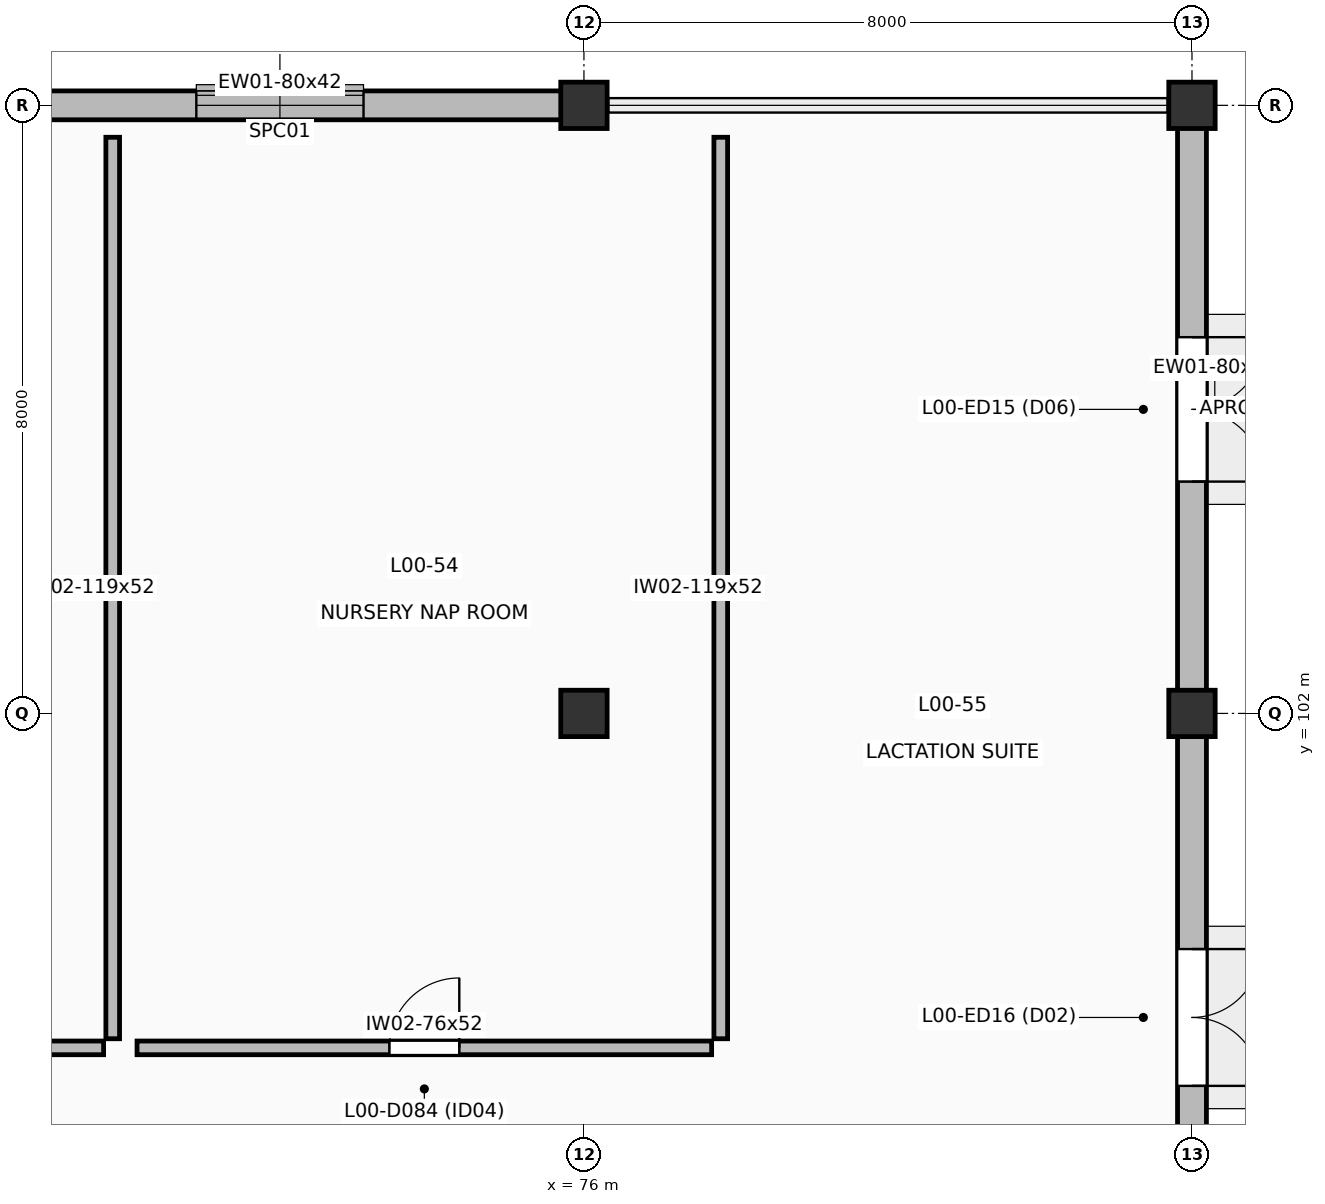
"""IFC4 building model, lengths in metres.
Left out: names, types, materials, properties, quantities, classifications, styles, units other than length and angle.
Written with IfcOpenShell. Run it as: python <this file> out.ifc"""

import sys

from ifc_helpers import new_model, si_unit, direction, frame, frame_2d, origin, origin_2d, place, context, subcontext, project, spatial, rectangle, extrude, element, fill, save


model = new_model("IFC4")
c1 = context("Model", 3, precision=1e-05, world=origin(), true_north=direction((0.0, 1.0)))
c2 = subcontext(c1, "Body", "Model", "MODEL_VIEW")
j1 = project(units=[si_unit("LENGTHUNIT", "METRE"), si_unit("PLANEANGLEUNIT", "RADIAN")], contexts=[c1])
p1 = place(None, origin())
s1 = spatial("IfcSite", under=j1, at=p1, CompositionType="ELEMENT")
p2 = place(p1, origin())
s2 = spatial("IfcBuilding", under=s1, at=p2, CompositionType="ELEMENT")
p3 = place(p2, origin())
s3 = spatial("IfcBuildingStorey", under=s2, at=p3, CompositionType="ELEMENT", Elevation=0.0)
for number, where, z_axis, x_axis in (
    (1, (76.0, 102.0, 0.0), (0.0, 0.0, 1.0), (1.0, 0.0, 0.0)),
    (2, (76.0, 110.0, 0.0), (0.0, 0.0, 1.0), (1.0, 0.0, 0.0)),
    (3, (84.0, 102.0, 0.0), (0.0, 0.0, 1.0), (1.0, 0.0, 0.0)),
    (4, (84.0, 110.0, 0.0), (0.0, 0.0, 1.0), (1.0, 0.0, 0.0)),
):
    element("IfcColumn", number, at=place(p3, frame(where, z_axis=z_axis, x_axis=x_axis)), inside=s3, PredefinedType="COLUMN", context=c2, shape_type="SweptSolid", body=[
        extrude(rectangle(XDim=0.61, YDim=0.61, at=origin_2d()), origin(), (0.0, 0.0, 1.0), 5.4),
    ])
p4 = place(p3, frame((68.0, 110.0, 0.0), z_axis=(0.0, 0.0, 1.0), x_axis=(1.0, 0.0, 0.0)))
e5 = element("IfcWall", 5, at=p4, inside=s3, PredefinedType="SOLIDWALL", context=c2, shape_type="SweptSolid", body=[
    extrude(rectangle(XDim=8.0, YDim=0.38, at=frame_2d((4.0, 0.0))), origin(), (0.0, 0.0, 1.0), 4.245),
])
p5 = place(p4, frame((2.9, 0.0, 0.85)))
e6 = element("IfcOpeningElement", 6, at=p5, cuts=e5, PredefinedType="OPENING", context=c2, shape_type="SweptSolid", body=[
    extrude(rectangle(XDim=2.2, YDim=2.8, at=frame_2d((1.1, 1.4))), frame((0.0, 0.2, 0.0), z_axis=(0.0, -1.0, 0.0), x_axis=(1.0, 0.0, 0.0)), (0.0, 0.0, 1.0), 0.4),
])
p6 = place(p3, frame((84.0, 110.0, 0.0), z_axis=(0.0, 0.0, 1.0), x_axis=(0.0, -1.0, 0.0)))
e7 = element("IfcWall", 7, at=p6, inside=s3, PredefinedType="SOLIDWALL", context=c2, shape_type="SweptSolid", body=[
    extrude(rectangle(XDim=8.0, YDim=0.38, at=frame_2d((4.0, 0.0))), origin(), (0.0, 0.0, 1.0), 4.445),
])
p7 = place(p6, frame((3.05, 0.0, 0.0)))
e8 = element("IfcOpeningElement", 8, at=p7, cuts=e7, PredefinedType="OPENING", context=c2, shape_type="SweptSolid", body=[
    extrude(rectangle(XDim=1.9, YDim=2.35, at=frame_2d((0.95, 1.175))), frame((0.0, 0.2, 0.0), z_axis=(0.0, -1.0, 0.0), x_axis=(1.0, 0.0, 0.0)), (0.0, 0.0, 1.0), 0.4),
])
p8 = place(p3, frame((84.0, 102.0, 0.0), z_axis=(0.0, 0.0, 1.0), x_axis=(0.0, -1.0, 0.0)))
e9 = element("IfcWall", 9, at=p8, inside=s3, PredefinedType="SOLIDWALL", context=c2, shape_type="SweptSolid", body=[
    extrude(rectangle(XDim=8.0, YDim=0.38, at=frame_2d((4.0, 0.0))), origin(), (0.0, 0.0, 1.0), 4.445),
])
p9 = place(p8, frame((3.1, 0.0, 0.0)))
e10 = element("IfcOpeningElement", 10, at=p9, cuts=e9, PredefinedType="OPENING", context=c2, shape_type="SweptSolid", body=[
    extrude(rectangle(XDim=1.8, YDim=2.3, at=frame_2d((0.9, 1.15))), frame((0.0, 0.2, 0.0), z_axis=(0.0, -1.0, 0.0), x_axis=(1.0, 0.0, 0.0)), (0.0, 0.0, 1.0), 0.4),
])
p10 = place(p3, frame((53.12, 97.6, 0.0), z_axis=(0.0, 0.0, 1.0), x_axis=(1.0, 0.0, 0.0)))
e11 = element("IfcWall", 11, at=p10, inside=s3, PredefinedType="PARTITIONING", context=c2, shape_type="SweptSolid", body=[
    extrude(rectangle(XDim=16.56, YDim=0.18, at=frame_2d((8.28, 0.0))), origin(), (0.0, 0.0, 1.0), 5.16),
])
p11 = place(p10, frame((7.82, 0.0, 0.0)))
e12 = element("IfcOpeningElement", 12, at=p11, cuts=e11, PredefinedType="OPENING", context=c2, shape_type="SweptSolid", body=[
    extrude(rectangle(XDim=0.92, YDim=2.1, at=frame_2d((0.46, 1.05))), frame((0.0, 0.1, 0.0), z_axis=(0.0, -1.0, 0.0), x_axis=(1.0, 0.0, 0.0)), (0.0, 0.0, 1.0), 0.2),
])
p12 = place(p3, frame((69.8, 97.72, 0.0), z_axis=(0.0, 0.0, 1.0), x_axis=(0.0, 1.0, 0.0)))
e13 = element("IfcWall", 13, at=p12, inside=s3, PredefinedType="PARTITIONING", context=c2, shape_type="SweptSolid", body=[
    extrude(rectangle(XDim=11.86, YDim=0.18, at=frame_2d((5.93, 0.0))), origin(), (0.0, 0.0, 1.0), 5.16),
])
p13 = place(p3, frame((70.12, 97.6, 0.0), z_axis=(0.0, 0.0, 1.0), x_axis=(1.0, 0.0, 0.0)))
e14 = element("IfcWall", 14, at=p13, inside=s3, PredefinedType="PARTITIONING", context=c2, shape_type="SweptSolid", body=[
    extrude(rectangle(XDim=7.56, YDim=0.18, at=frame_2d((3.78, 0.0))), origin(), (0.0, 0.0, 1.0), 5.16),
])
p14 = place(p13, frame((3.32, 0.0, 0.0)))
e15 = element("IfcOpeningElement", 15, at=p14, cuts=e14, PredefinedType="OPENING", context=c2, shape_type="SweptSolid", body=[
    extrude(rectangle(XDim=0.92, YDim=2.1, at=frame_2d((0.46, 1.05))), frame((0.0, 0.1, 0.0), z_axis=(0.0, -1.0, 0.0), x_axis=(1.0, 0.0, 0.0)), (0.0, 0.0, 1.0), 0.2),
])
p15 = place(p3, frame((77.8, 97.72, 0.0), z_axis=(0.0, 0.0, 1.0), x_axis=(0.0, 1.0, 0.0)))
e16 = element("IfcWall", 16, at=p15, inside=s3, PredefinedType="PARTITIONING", context=c2, shape_type="SweptSolid", body=[
    extrude(rectangle(XDim=11.86, YDim=0.18, at=frame_2d((5.93, 0.0))), origin(), (0.0, 0.0, 1.0), 5.16),
])
p16 = place(p5, origin())
e17 = element("IfcWindow", 17, at=p16, inside=s3, PartitioningType="DOUBLE_PANEL_VERTICAL", PredefinedType="WINDOW", context=c2, shape_type="SweptSolid", body=[
    extrude(rectangle(XDim=2.2, YDim=2.8, at=frame_2d((1.1, 1.4))), frame((0.0, 0.03, 0.0), z_axis=(0.0, -1.0, 0.0), x_axis=(1.0, 0.0, 0.0)), (0.0, 0.0, 1.0), 0.06),
])
fill(e6, e17)
p17 = place(p7, origin())
e18 = element("IfcDoor", 18, at=p17, inside=s3, OperationType="DOUBLE_DOOR_SINGLE_SWING", PredefinedType="DOOR", context=c2, shape_type="SweptSolid", body=[
    extrude(rectangle(XDim=1.9, YDim=2.35, at=frame_2d((0.95, 1.175))), frame((0.0, 0.025, 0.0), z_axis=(0.0, -1.0, 0.0), x_axis=(1.0, 0.0, 0.0)), (0.0, 0.0, 1.0), 0.05),
])
fill(e8, e18)
p18 = place(p9, origin())
e19 = element("IfcDoor", 19, at=p18, inside=s3, OperationType="DOUBLE_DOOR_SINGLE_SWING", PredefinedType="DOOR", context=c2, shape_type="SweptSolid", body=[
    extrude(rectangle(XDim=1.8, YDim=2.3, at=frame_2d((0.9, 1.15))), frame((0.0, 0.025, 0.0), z_axis=(0.0, -1.0, 0.0), x_axis=(1.0, 0.0, 0.0)), (0.0, 0.0, 1.0), 0.05),
])
fill(e10, e19)
p19 = place(p14, origin())
e20 = element("IfcDoor", 20, at=p19, inside=s3, OperationType="SINGLE_SWING_RIGHT", PredefinedType="DOOR", context=c2, shape_type="SweptSolid", body=[
    extrude(rectangle(XDim=0.92, YDim=2.1, at=frame_2d((0.46, 1.05))), frame((0.0, 0.025, 0.0), z_axis=(0.0, -1.0, 0.0), x_axis=(1.0, 0.0, 0.0)), (0.0, 0.0, 1.0), 0.05),
])
fill(e15, e20)
save(model, sys.argv[1])
